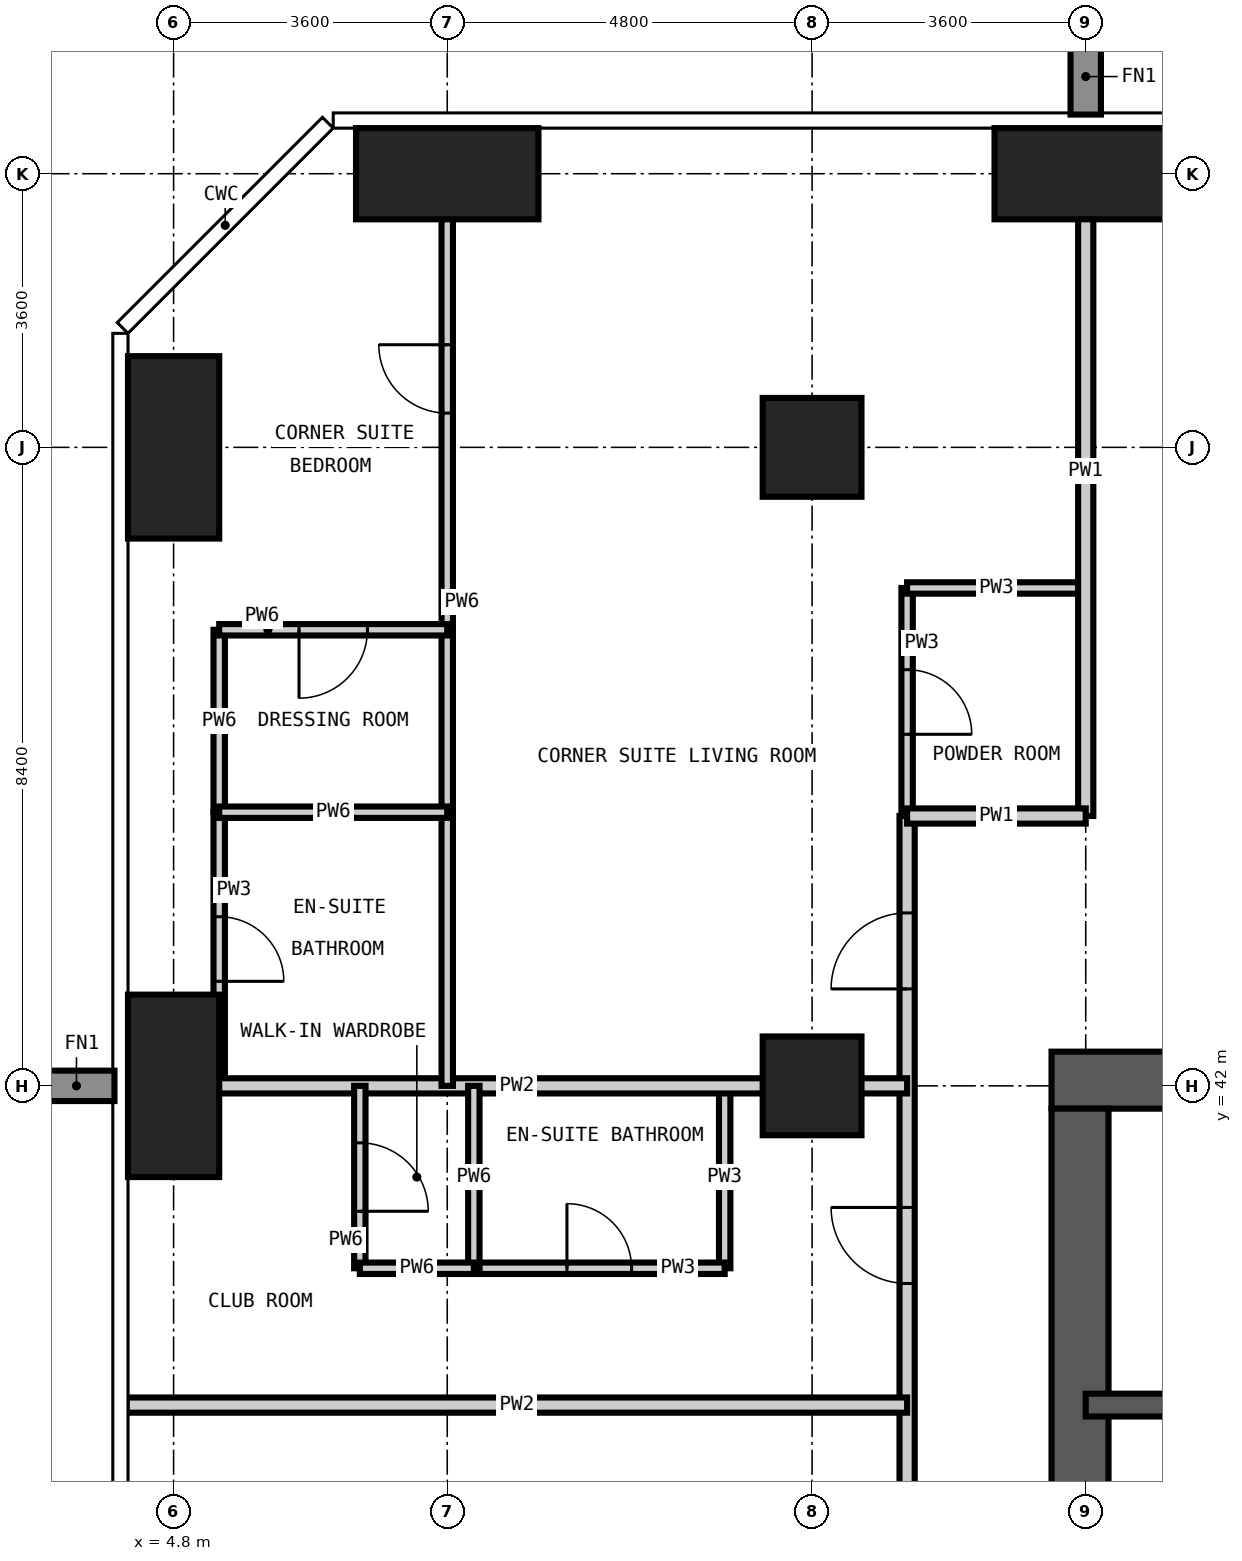
"""IFC4 building model, lengths in metres.
Left out: names, types, materials, properties, quantities, classifications, styles, units other than length and angle.
Written with IfcOpenShell. Run it as: python <this file> out.ifc"""

import sys

from ifc_helpers import new_model, si_unit, direction, frame, frame_2d, origin, origin_2d, place, context, subcontext, project, spatial, rectangle, extrude, element, fill, save


model = new_model("IFC4")
c1 = context("Model", 3, precision=1e-05, world=origin(), true_north=direction((0.0, 1.0)))
c2 = subcontext(c1, "Body", "Model", "MODEL_VIEW")
j1 = project(units=[si_unit("LENGTHUNIT", "METRE"), si_unit("PLANEANGLEUNIT", "RADIAN")], contexts=[c1])
p1 = place(None, origin())
s1 = spatial("IfcSite", under=j1, at=p1, CompositionType="ELEMENT")
p2 = place(p1, origin())
s2 = spatial("IfcBuilding", under=s1, at=p2, CompositionType="ELEMENT")
p3 = place(p2, frame((0.0, 0.0, 177.0)))
s3 = spatial("IfcBuildingStorey", under=s2, at=p3, CompositionType="ELEMENT", Elevation=177.0)
for number, where, z_axis, x_axis in (
    (1, (4.8, 42.0, -0.35), (0.0, 0.0, 1.0), (1.0, 0.0, 0.0)),
    (2, (4.8, 50.4, -0.35), (0.0, 0.0, 1.0), (1.0, 0.0, 0.0)),
):
    element("IfcColumn", number, at=place(p3, frame(where, z_axis=z_axis, x_axis=x_axis)), inside=s3, PredefinedType="COLUMN", context=c2, shape_type="SweptSolid", body=[
        extrude(rectangle(XDim=1.2, YDim=2.4, at=origin_2d()), origin(), (0.0, 0.0, 1.0), 3.6),
    ])
p4 = place(p3, frame((8.4, 54.0, -0.35), z_axis=(0.0, 0.0, 1.0), x_axis=(1.0, 0.0, 0.0)))
e3 = element("IfcColumn", 3, at=p4, inside=s3, PredefinedType="COLUMN", context=c2, shape_type="SweptSolid", body=[
    extrude(rectangle(XDim=2.4, YDim=1.2, at=origin_2d()), origin(), (0.0, 0.0, 1.0), 3.6),
])
for number, where, z_axis, x_axis in (
    (4, (13.2, 42.0, -0.35), (0.0, 0.0, 1.0), (1.0, 0.0, 0.0)),
    (5, (13.2, 50.4, -0.35), (0.0, 0.0, 1.0), (1.0, 0.0, 0.0)),
):
    element("IfcColumn", number, at=place(p3, frame(where, z_axis=z_axis, x_axis=x_axis)), inside=s3, PredefinedType="COLUMN", context=c2, shape_type="SweptSolid", body=[
        extrude(rectangle(XDim=1.3, YDim=1.3, at=origin_2d()), origin(), (0.0, 0.0, 1.0), 3.6),
    ])
p5 = place(p3, frame((16.8, 54.0, -0.35), z_axis=(0.0, 0.0, 1.0), x_axis=(1.0, 0.0, 0.0)))
e6 = element("IfcColumn", 6, at=p5, inside=s3, PredefinedType="COLUMN", context=c2, shape_type="SweptSolid", body=[
    extrude(rectangle(XDim=2.4, YDim=1.2, at=origin_2d()), origin(), (0.0, 0.0, 1.0), 3.6),
])
p6 = place(p3, frame((42.45, 42.075, -0.35), z_axis=(0.0, 0.0, 1.0), x_axis=(-1.0, 0.0, 0.0)))
e7 = element("IfcWall", 7, at=p6, inside=s3, PredefinedType="SHEAR", context=c2, shape_type="SweptSolid", body=[
    extrude(rectangle(XDim=26.1, YDim=0.75, at=frame_2d((13.05, 0.0))), origin(), (0.0, 0.0, 1.0), 3.6),
])
p7 = place(p6, frame((20.95, 0.0, 0.35)))
e8 = element("IfcOpeningElement", 8, at=p7, cuts=e7, PredefinedType="OPENING", context=c2, shape_type="SweptSolid", body=[
    extrude(rectangle(XDim=1.0, YDim=2.1, at=frame_2d((0.5, 1.05))), frame((0.0, 0.385, 0.0), z_axis=(0.0, -1.0, 0.0), x_axis=(1.0, 0.0, 0.0)), (0.0, 0.0, 1.0), 0.77),
])
p8 = place(p6, frame((10.35, 0.0, 0.35)))
e9 = element("IfcOpeningElement", 9, at=p8, cuts=e7, PredefinedType="OPENING", context=c2, shape_type="SweptSolid", body=[
    extrude(rectangle(XDim=1.2, YDim=2.2, at=frame_2d((0.6, 1.1))), frame((0.0, 0.385, 0.0), z_axis=(0.0, -1.0, 0.0), x_axis=(1.0, 0.0, 0.0)), (0.0, 0.0, 1.0), 0.77),
])
p9 = place(p3, frame((16.725, 41.7, -0.35), z_axis=(0.0, 0.0, 1.0), x_axis=(0.0, -1.0, 0.0)))
e10 = element("IfcWall", 10, at=p9, inside=s3, PredefinedType="SHEAR", context=c2, shape_type="SweptSolid", body=[
    extrude(rectangle(XDim=24.6, YDim=0.75, at=frame_2d((12.3, 0.0))), origin(), (0.0, 0.0, 1.0), 3.6),
])
p10 = place(p9, frame((11.4, 0.0, 0.35)))
e11 = element("IfcOpeningElement", 11, at=p10, cuts=e10, PredefinedType="OPENING", context=c2, shape_type="SweptSolid", body=[
    extrude(rectangle(XDim=1.8, YDim=2.2, at=frame_2d((0.9, 1.1))), frame((0.0, 0.385, 0.0), z_axis=(0.0, -1.0, 0.0), x_axis=(1.0, 0.0, 0.0)), (0.0, 0.0, 1.0), 0.77),
])
p11 = place(p9, frame((20.2, 0.0, 0.35)))
e12 = element("IfcOpeningElement", 12, at=p11, cuts=e10, PredefinedType="OPENING", context=c2, shape_type="SweptSolid", body=[
    extrude(rectangle(XDim=1.0, YDim=2.1, at=frame_2d((0.5, 1.05))), frame((0.0, 0.385, 0.0), z_axis=(0.0, -1.0, 0.0), x_axis=(1.0, 0.0, 0.0)), (0.0, 0.0, 1.0), 0.77),
])
p12 = place(p9, frame((5.5, 0.0, 0.35)))
e13 = element("IfcOpeningElement", 13, at=p12, cuts=e10, PredefinedType="OPENING", context=c2, shape_type="SweptSolid", body=[
    extrude(rectangle(XDim=1.0, YDim=2.1, at=frame_2d((0.5, 1.05))), frame((0.0, 0.385, 0.0), z_axis=(0.0, -1.0, 0.0), x_axis=(1.0, 0.0, 0.0)), (0.0, 0.0, 1.0), 0.77),
])
p13 = place(p3, frame((16.8, 37.8, -0.35), z_axis=(0.0, 0.0, 1.0), x_axis=(1.0, 0.0, 0.0)))
e14 = element("IfcWall", 14, at=p13, inside=s3, PredefinedType="SHEAR", context=c2, shape_type="SweptSolid", body=[
    extrude(rectangle(XDim=8.4, YDim=0.3, at=frame_2d((4.2, 0.0))), origin(), (0.0, 0.0, 1.0), 3.6),
])
p14 = place(p3, frame((5.4, 42.0, 0.0), z_axis=(0.0, 0.0, 1.0), x_axis=(0.0, 1.0, 0.0)))
e15 = element("IfcWall", 15, at=p14, inside=s3, PredefinedType="PARTITIONING", context=c2, shape_type="SweptSolid", body=[
    extrude(rectangle(XDim=3.6, YDim=0.15, at=frame_2d((1.8, 0.0))), origin(), (0.0, 0.0, 1.0), 3.25),
])
p15 = place(p14, frame((1.375, 0.0, 0.0)))
e16 = element("IfcOpeningElement", 16, at=p15, cuts=e15, PredefinedType="OPENING", context=c2, shape_type="SweptSolid", body=[
    extrude(rectangle(XDim=0.85, YDim=2.1, at=frame_2d((0.425, 1.05))), frame((0.0, 0.085, 0.0), z_axis=(0.0, -1.0, 0.0), x_axis=(1.0, 0.0, 0.0)), (0.0, 0.0, 1.0), 0.17),
])
p16 = place(p3, frame((12.05, 39.6, 0.0), z_axis=(0.0, 0.0, 1.0), x_axis=(0.0, 1.0, 0.0)))
e17 = element("IfcWall", 17, at=p16, inside=s3, PredefinedType="PARTITIONING", context=c2, shape_type="SweptSolid", body=[
    extrude(rectangle(XDim=2.4, YDim=0.15, at=frame_2d((1.2, 0.0))), origin(), (0.0, 0.0, 1.0), 3.25),
])
p17 = place(p3, frame((14.45, 45.55, 0.0), z_axis=(0.0, 0.0, 1.0), x_axis=(0.0, 1.0, 0.0)))
e18 = element("IfcWall", 18, at=p17, inside=s3, PredefinedType="PARTITIONING", context=c2, shape_type="SweptSolid", body=[
    extrude(rectangle(XDim=3.0, YDim=0.15, at=frame_2d((1.5, 0.0))), origin(), (0.0, 0.0, 1.0), 3.25),
])
p18 = place(p17, frame((1.075, 0.0, 0.0)))
e19 = element("IfcOpeningElement", 19, at=p18, cuts=e18, PredefinedType="OPENING", context=c2, shape_type="SweptSolid", body=[
    extrude(rectangle(XDim=0.85, YDim=2.1, at=frame_2d((0.425, 1.05))), frame((0.0, 0.085, 0.0), z_axis=(0.0, -1.0, 0.0), x_axis=(1.0, 0.0, 0.0)), (0.0, 0.0, 1.0), 0.17),
])
p19 = place(p3, frame((8.75, 39.6, 0.0), z_axis=(0.0, 0.0, 1.0), x_axis=(1.0, 0.0, 0.0)))
e20 = element("IfcWall", 20, at=p19, inside=s3, PredefinedType="PARTITIONING", context=c2, shape_type="SweptSolid", body=[
    extrude(rectangle(XDim=3.3, YDim=0.15, at=frame_2d((1.65, 0.0))), origin(), (0.0, 0.0, 1.0), 3.25),
])
p20 = place(p19, frame((1.225, 0.0, 0.0)))
e21 = element("IfcOpeningElement", 21, at=p20, cuts=e20, PredefinedType="OPENING", context=c2, shape_type="SweptSolid", body=[
    extrude(rectangle(XDim=0.85, YDim=2.1, at=frame_2d((0.425, 1.05))), frame((0.0, 0.085, 0.0), z_axis=(0.0, -1.0, 0.0), x_axis=(1.0, 0.0, 0.0)), (0.0, 0.0, 1.0), 0.17),
])
p21 = place(p3, frame((14.45, 48.55, 0.0), z_axis=(0.0, 0.0, 1.0), x_axis=(1.0, 0.0, 0.0)))
e22 = element("IfcWall", 22, at=p21, inside=s3, PredefinedType="PARTITIONING", context=c2, shape_type="SweptSolid", body=[
    extrude(rectangle(XDim=2.35, YDim=0.15, at=frame_2d((1.175, 0.0))), origin(), (0.0, 0.0, 1.0), 3.25),
])
p22 = place(p3, frame((14.45, 14.45, 0.0), z_axis=(0.0, 0.0, 1.0), x_axis=(0.0, 1.0, 0.0)))
e23 = element("IfcWall", 23, at=p22, inside=s3, PredefinedType="PARTITIONING", context=c2, shape_type="SweptSolid", body=[
    extrude(rectangle(XDim=31.1, YDim=0.2, at=frame_2d((15.55, 0.0))), origin(), (0.0, 0.0, 1.0), 3.25),
])
p23 = place(p22, frame((6.05, 0.0, 0.0)))
e24 = element("IfcOpeningElement", 24, at=p23, cuts=e23, PredefinedType="OPENING", context=c2, shape_type="SweptSolid", body=[
    extrude(rectangle(XDim=1.0, YDim=2.2, at=frame_2d((0.5, 1.1))), frame((0.0, 0.11, 0.0), z_axis=(0.0, -1.0, 0.0), x_axis=(1.0, 0.0, 0.0)), (0.0, 0.0, 1.0), 0.22),
])
p24 = place(p22, frame((11.95, 0.0, 0.0)))
e25 = element("IfcOpeningElement", 25, at=p24, cuts=e23, PredefinedType="OPENING", context=c2, shape_type="SweptSolid", body=[
    extrude(rectangle(XDim=1.8, YDim=2.4, at=frame_2d((0.9, 1.2))), frame((0.0, 0.11, 0.0), z_axis=(0.0, -1.0, 0.0), x_axis=(1.0, 0.0, 0.0)), (0.0, 0.0, 1.0), 0.22),
])
p25 = place(p22, frame((19.575, 0.0, 0.0)))
e26 = element("IfcOpeningElement", 26, at=p25, cuts=e23, PredefinedType="OPENING", context=c2, shape_type="SweptSolid", body=[
    extrude(rectangle(XDim=1.0, YDim=2.2, at=frame_2d((0.5, 1.1))), frame((0.0, 0.11, 0.0), z_axis=(0.0, -1.0, 0.0), x_axis=(1.0, 0.0, 0.0)), (0.0, 0.0, 1.0), 0.22),
])
p26 = place(p22, frame((24.95, 0.0, 0.0)))
e27 = element("IfcOpeningElement", 27, at=p26, cuts=e23, PredefinedType="OPENING", context=c2, shape_type="SweptSolid", body=[
    extrude(rectangle(XDim=1.0, YDim=2.2, at=frame_2d((0.5, 1.1))), frame((0.0, 0.11, 0.0), z_axis=(0.0, -1.0, 0.0), x_axis=(1.0, 0.0, 0.0)), (0.0, 0.0, 1.0), 0.22),
])
p27 = place(p22, frame((0.675, 0.0, 0.0)))
e28 = element("IfcOpeningElement", 28, at=p27, cuts=e23, PredefinedType="OPENING", context=c2, shape_type="SweptSolid", body=[
    extrude(rectangle(XDim=1.0, YDim=2.2, at=frame_2d((0.5, 1.1))), frame((0.0, 0.11, 0.0), z_axis=(0.0, -1.0, 0.0), x_axis=(1.0, 0.0, 0.0)), (0.0, 0.0, 1.0), 0.22),
])
p28 = place(p22, frame((28.825, 0.0, 0.0)))
e29 = element("IfcOpeningElement", 29, at=p28, cuts=e23, PredefinedType="OPENING", context=c2, shape_type="SweptSolid", body=[
    extrude(rectangle(XDim=1.0, YDim=2.2, at=frame_2d((0.5, 1.1))), frame((0.0, 0.11, 0.0), z_axis=(0.0, -1.0, 0.0), x_axis=(1.0, 0.0, 0.0)), (0.0, 0.0, 1.0), 0.22),
])
p29 = place(p3, frame((16.8, 45.55, 0.0), z_axis=(0.0, 0.0, 1.0), x_axis=(0.0, 1.0, 0.0)))
e30 = element("IfcWall", 30, at=p29, inside=s3, PredefinedType="PARTITIONING", context=c2, shape_type="SweptSolid", body=[
    extrude(rectangle(XDim=9.068, YDim=0.2, at=frame_2d((4.534, 0.0))), origin(), (0.0, 0.0, 1.0), 3.25),
])
p30 = place(p3, frame((14.45, 45.55, 0.0), z_axis=(0.0, 0.0, 1.0), x_axis=(1.0, 0.0, 0.0)))
e31 = element("IfcWall", 31, at=p30, inside=s3, PredefinedType="PARTITIONING", context=c2, shape_type="SweptSolid", body=[
    extrude(rectangle(XDim=2.35, YDim=0.2, at=frame_2d((1.175, 0.0))), origin(), (0.0, 0.0, 1.0), 3.25),
])
for number, where, z_axis, x_axis in (
    (32, (4.182, 37.8, 0.0), (0.0, 0.0, 1.0), (1.0, 0.0, 0.0)),
    (33, (4.182, 42.0, 0.0), (0.0, 0.0, 1.0), (1.0, 0.0, 0.0)),
):
    element("IfcWall", number, at=place(p3, frame(where, z_axis=z_axis, x_axis=x_axis)), inside=s3, PredefinedType="PARTITIONING", context=c2, shape_type="SweptSolid", body=[
        extrude(rectangle(XDim=10.268, YDim=0.2, at=frame_2d((5.134, 0.0))), origin(), (0.0, 0.0, 1.0), 3.25),
    ])
p31 = place(p3, frame((5.4, 45.6, 0.0), z_axis=(0.0, 0.0, 1.0), x_axis=(0.0, 1.0, 0.0)))
e34 = element("IfcWall", 34, at=p31, inside=s3, PredefinedType="PARTITIONING", context=c2, shape_type="SweptSolid", body=[
    extrude(rectangle(XDim=2.4, YDim=0.15, at=frame_2d((1.2, 0.0))), origin(), (0.0, 0.0, 1.0), 3.25),
])
p32 = place(p3, frame((7.25, 39.6, 0.0), z_axis=(0.0, 0.0, 1.0), x_axis=(0.0, 1.0, 0.0)))
e35 = element("IfcWall", 35, at=p32, inside=s3, PredefinedType="PARTITIONING", context=c2, shape_type="SweptSolid", body=[
    extrude(rectangle(XDim=2.4, YDim=0.15, at=frame_2d((1.2, 0.0))), origin(), (0.0, 0.0, 1.0), 3.25),
])
p33 = place(p32, frame((0.75, 0.0, 0.0)))
e36 = element("IfcOpeningElement", 36, at=p33, cuts=e35, PredefinedType="OPENING", context=c2, shape_type="SweptSolid", body=[
    extrude(rectangle(XDim=0.9, YDim=2.1, at=frame_2d((0.45, 1.05))), frame((0.0, 0.085, 0.0), z_axis=(0.0, -1.0, 0.0), x_axis=(1.0, 0.0, 0.0)), (0.0, 0.0, 1.0), 0.17),
])
p34 = place(p3, frame((8.4, 42.0, 0.0), z_axis=(0.0, 0.0, 1.0), x_axis=(0.0, 1.0, 0.0)))
e37 = element("IfcWall", 37, at=p34, inside=s3, PredefinedType="PARTITIONING", context=c2, shape_type="SweptSolid", body=[
    extrude(rectangle(XDim=12.618, YDim=0.15, at=frame_2d((6.309, 0.0))), origin(), (0.0, 0.0, 1.0), 3.25),
])
p35 = place(p34, frame((8.85, 0.0, 0.0)))
e38 = element("IfcOpeningElement", 38, at=p35, cuts=e37, PredefinedType="OPENING", context=c2, shape_type="SweptSolid", body=[
    extrude(rectangle(XDim=0.9, YDim=2.1, at=frame_2d((0.45, 1.05))), frame((0.0, 0.085, 0.0), z_axis=(0.0, -1.0, 0.0), x_axis=(1.0, 0.0, 0.0)), (0.0, 0.0, 1.0), 0.17),
])
p36 = place(p3, frame((8.75, 39.6, 0.0), z_axis=(0.0, 0.0, 1.0), x_axis=(0.0, 1.0, 0.0)))
e39 = element("IfcWall", 39, at=p36, inside=s3, PredefinedType="PARTITIONING", context=c2, shape_type="SweptSolid", body=[
    extrude(rectangle(XDim=2.4, YDim=0.15, at=frame_2d((1.2, 0.0))), origin(), (0.0, 0.0, 1.0), 3.25),
])
p37 = place(p3, frame((7.25, 39.6, 0.0), z_axis=(0.0, 0.0, 1.0), x_axis=(1.0, 0.0, 0.0)))
e40 = element("IfcWall", 40, at=p37, inside=s3, PredefinedType="PARTITIONING", context=c2, shape_type="SweptSolid", body=[
    extrude(rectangle(XDim=1.5, YDim=0.15, at=frame_2d((0.75, 0.0))), origin(), (0.0, 0.0, 1.0), 3.25),
])
p38 = place(p3, frame((5.4, 45.6, 0.0), z_axis=(0.0, 0.0, 1.0), x_axis=(1.0, 0.0, 0.0)))
e41 = element("IfcWall", 41, at=p38, inside=s3, PredefinedType="PARTITIONING", context=c2, shape_type="SweptSolid", body=[
    extrude(rectangle(XDim=3.0, YDim=0.15, at=frame_2d((1.5, 0.0))), origin(), (0.0, 0.0, 1.0), 3.25),
])
p39 = place(p3, frame((5.4, 48.0, 0.0), z_axis=(0.0, 0.0, 1.0), x_axis=(1.0, 0.0, 0.0)))
e42 = element("IfcWall", 42, at=p39, inside=s3, PredefinedType="PARTITIONING", context=c2, shape_type="SweptSolid", body=[
    extrude(rectangle(XDim=3.0, YDim=0.15, at=frame_2d((1.5, 0.0))), origin(), (0.0, 0.0, 1.0), 3.25),
])
p40 = place(p39, frame((1.05, 0.0, 0.0)))
e43 = element("IfcOpeningElement", 43, at=p40, cuts=e42, PredefinedType="OPENING", context=c2, shape_type="SweptSolid", body=[
    extrude(rectangle(XDim=0.9, YDim=2.1, at=frame_2d((0.45, 1.05))), frame((0.0, 0.085, 0.0), z_axis=(0.0, -1.0, 0.0), x_axis=(1.0, 0.0, 0.0)), (0.0, 0.0, 1.0), 0.17),
])
p41 = place(p26, origin())
e44 = element("IfcDoor", 44, at=p41, inside=s3, OperationType="SINGLE_SWING_RIGHT", PredefinedType="DOOR", context=c2, shape_type="SweptSolid", body=[
    extrude(rectangle(XDim=1.0, YDim=2.2, at=frame_2d((0.5, 1.1))), frame((0.0, 0.025, 0.0), z_axis=(0.0, -1.0, 0.0), x_axis=(1.0, 0.0, 0.0)), (0.0, 0.0, 1.0), 0.05),
])
fill(e27, e44)
p42 = place(p20, origin())
e45 = element("IfcDoor", 45, at=p42, inside=s3, OperationType="SINGLE_SWING_LEFT", PredefinedType="DOOR", context=c2, shape_type="SweptSolid", body=[
    extrude(rectangle(XDim=0.85, YDim=2.1, at=frame_2d((0.425, 1.05))), frame((0.0, 0.025, 0.0), z_axis=(0.0, -1.0, 0.0), x_axis=(1.0, 0.0, 0.0)), (0.0, 0.0, 1.0), 0.05),
])
fill(e21, e45)
p43 = place(p33, frame((0.9, 0.0, 0.0), z_axis=(0.0, 0.0, 1.0), x_axis=(-1.0, 0.0, 0.0)))
e46 = element("IfcDoor", 46, at=p43, inside=s3, OperationType="SINGLE_SWING_RIGHT", PredefinedType="DOOR", context=c2, shape_type="SweptSolid", body=[
    extrude(rectangle(XDim=0.9, YDim=2.1, at=frame_2d((0.45, 1.05))), frame((0.0, 0.025, 0.0), z_axis=(0.0, -1.0, 0.0), x_axis=(1.0, 0.0, 0.0)), (0.0, 0.0, 1.0), 0.05),
])
fill(e36, e46)
p44 = place(p28, origin())
e47 = element("IfcDoor", 47, at=p44, inside=s3, OperationType="SINGLE_SWING_LEFT", PredefinedType="DOOR", context=c2, shape_type="SweptSolid", body=[
    extrude(rectangle(XDim=1.0, YDim=2.2, at=frame_2d((0.5, 1.1))), frame((0.0, 0.025, 0.0), z_axis=(0.0, -1.0, 0.0), x_axis=(1.0, 0.0, 0.0)), (0.0, 0.0, 1.0), 0.05),
])
fill(e29, e47)
p45 = place(p18, frame((0.85, 0.0, 0.0), z_axis=(0.0, 0.0, 1.0), x_axis=(-1.0, 0.0, 0.0)))
e48 = element("IfcDoor", 48, at=p45, inside=s3, OperationType="SINGLE_SWING_RIGHT", PredefinedType="DOOR", context=c2, shape_type="SweptSolid", body=[
    extrude(rectangle(XDim=0.85, YDim=2.1, at=frame_2d((0.425, 1.05))), frame((0.0, 0.025, 0.0), z_axis=(0.0, -1.0, 0.0), x_axis=(1.0, 0.0, 0.0)), (0.0, 0.0, 1.0), 0.05),
])
fill(e19, e48)
p46 = place(p35, origin())
e49 = element("IfcDoor", 49, at=p46, inside=s3, OperationType="SINGLE_SWING_RIGHT", PredefinedType="DOOR", context=c2, shape_type="SweptSolid", body=[
    extrude(rectangle(XDim=0.9, YDim=2.1, at=frame_2d((0.45, 1.05))), frame((0.0, 0.025, 0.0), z_axis=(0.0, -1.0, 0.0), x_axis=(1.0, 0.0, 0.0)), (0.0, 0.0, 1.0), 0.05),
])
fill(e38, e49)
p47 = place(p15, frame((0.85, 0.0, 0.0), z_axis=(0.0, 0.0, 1.0), x_axis=(-1.0, 0.0, 0.0)))
e50 = element("IfcDoor", 50, at=p47, inside=s3, OperationType="SINGLE_SWING_RIGHT", PredefinedType="DOOR", context=c2, shape_type="SweptSolid", body=[
    extrude(rectangle(XDim=0.85, YDim=2.1, at=frame_2d((0.425, 1.05))), frame((0.0, 0.025, 0.0), z_axis=(0.0, -1.0, 0.0), x_axis=(1.0, 0.0, 0.0)), (0.0, 0.0, 1.0), 0.05),
])
fill(e16, e50)
p48 = place(p40, frame((0.9, 0.0, 0.0), z_axis=(0.0, 0.0, 1.0), x_axis=(-1.0, 0.0, 0.0)))
e51 = element("IfcDoor", 51, at=p48, inside=s3, OperationType="SINGLE_SWING_RIGHT", PredefinedType="DOOR", context=c2, shape_type="SweptSolid", body=[
    extrude(rectangle(XDim=0.9, YDim=2.1, at=frame_2d((0.45, 1.05))), frame((0.0, 0.025, 0.0), z_axis=(0.0, -1.0, 0.0), x_axis=(1.0, 0.0, 0.0)), (0.0, 0.0, 1.0), 0.05),
])
fill(e43, e51)
save(model, sys.argv[1])
